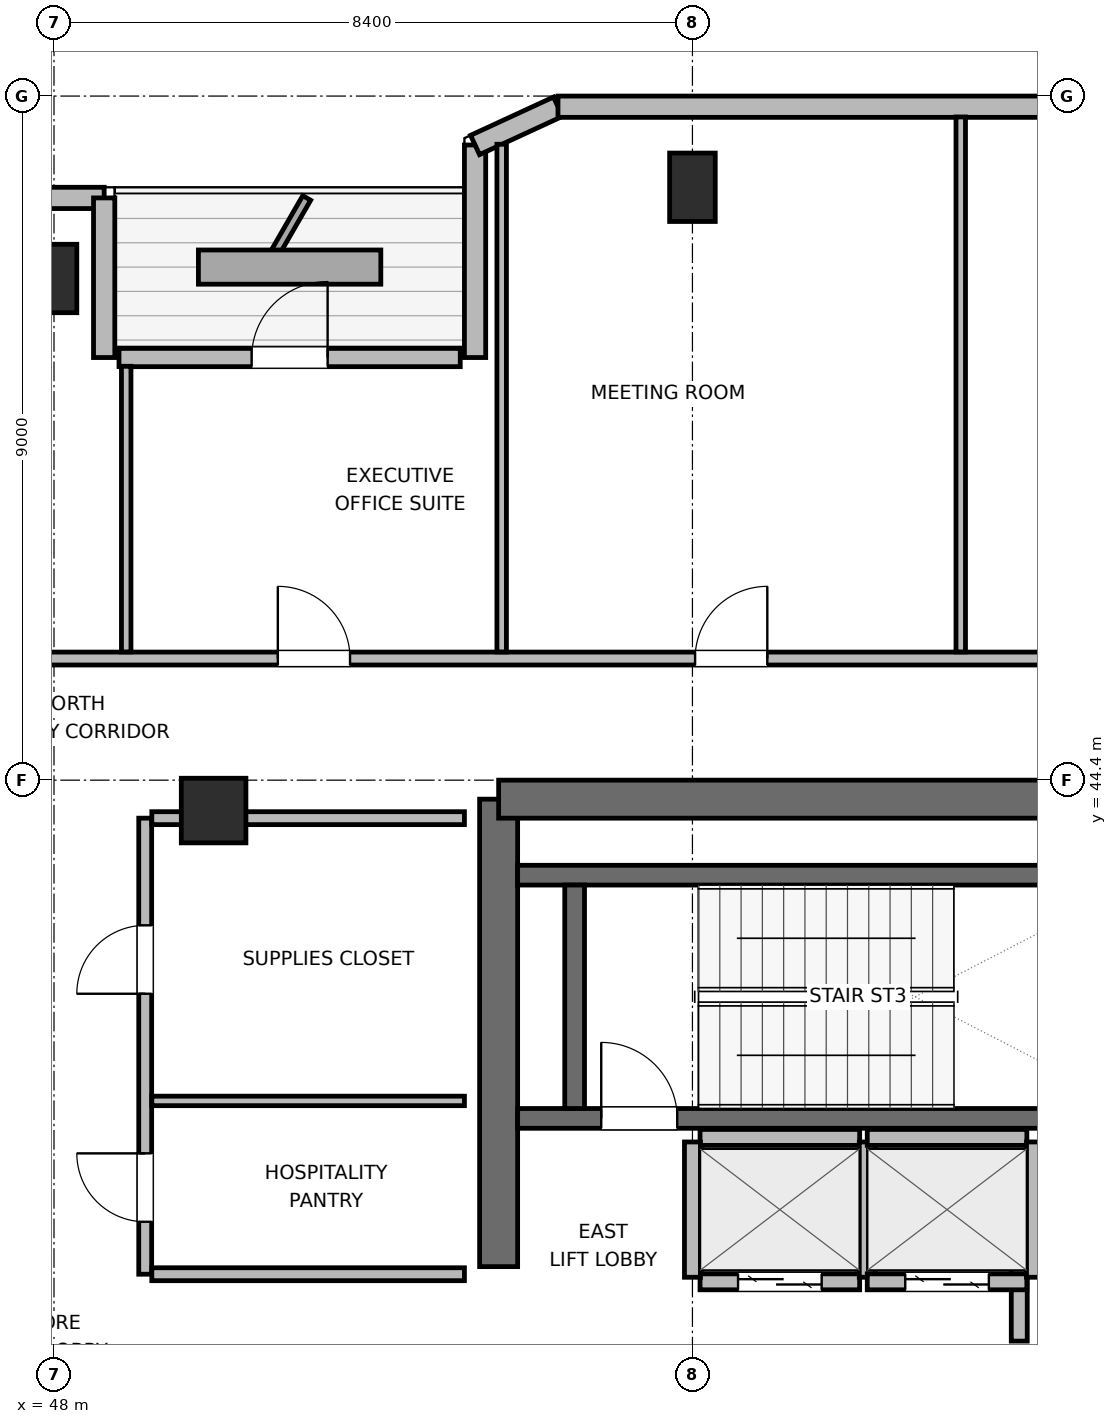
"""IFC4 building model, lengths in metres.
Left out: names, types, materials, properties, quantities, classifications, styles, units other than length and angle.
Written with IfcOpenShell. Run it as: python <this file> out.ifc"""

import sys

from ifc_helpers import new_model, si_unit, direction, frame, frame_2d, origin, origin_2d, place, context, subcontext, project, spatial, rectangle, extrude, element, fill, save


model = new_model("IFC4")
c1 = context("Model", 3, precision=1e-05, world=origin(), true_north=direction((0.0, 1.0)))
c2 = subcontext(c1, "Body", "Model", "MODEL_VIEW")
j1 = project(units=[si_unit("LENGTHUNIT", "METRE"), si_unit("PLANEANGLEUNIT", "RADIAN")], contexts=[c1])
p1 = place(None, origin())
s1 = spatial("IfcSite", under=j1, at=p1, CompositionType="ELEMENT")
p2 = place(p1, origin())
s2 = spatial("IfcBuilding", under=s1, at=p2, CompositionType="ELEMENT")
p3 = place(p2, frame((0.0, 0.0, 350.4)))
s3 = spatial("IfcBuildingStorey", under=s2, at=p3, CompositionType="ELEMENT", Elevation=350.4)
p4 = place(p3, frame((53.85, 38.0, 0.0), z_axis=(0.0, 0.0, 1.0), x_axis=(0.0, 1.0, 0.0)))
e1 = element("IfcWall", 1, at=p4, inside=s3, PredefinedType="SHEAR", context=c2, shape_type="SweptSolid", body=[
    extrude(rectangle(XDim=6.15, YDim=0.5, at=frame_2d((3.075, 0.0))), origin(), (0.0, 0.0, 1.0), 4.5),
])
p5 = place(p3, frame((53.85, 44.15, 0.0), z_axis=(0.0, 0.0, 1.0), x_axis=(1.0, 0.0, 0.0)))
e2 = element("IfcWall", 2, at=p5, inside=s3, PredefinedType="SHEAR", context=c2, shape_type="SweptSolid", body=[
    extrude(rectangle(XDim=9.5, YDim=0.5, at=frame_2d((4.75, 0.0))), origin(), (0.0, 0.0, 1.0), 4.5),
])
p6 = place(p3, frame((54.1, 39.95, 0.0), z_axis=(0.0, 0.0, 1.0), x_axis=(1.0, 0.0, 0.0)))
e3 = element("IfcWall", 3, at=p6, inside=s3, PredefinedType="SHEAR", context=c2, shape_type="SweptSolid", body=[
    extrude(rectangle(XDim=9.0, YDim=0.26, at=frame_2d((4.5, 0.0))), origin(), (0.0, 0.0, 1.0), 4.5),
])
p7 = place(p6, frame((1.1, 0.0, 0.0)))
e4 = element("IfcOpeningElement", 4, at=p7, cuts=e3, PredefinedType="OPENING", context=c2, shape_type="SweptSolid", body=[
    extrude(rectangle(XDim=1.0, YDim=2.04, at=frame_2d((0.5, 1.02))), frame((0.0, 0.14, 0.0), z_axis=(0.0, -1.0, 0.0), x_axis=(1.0, 0.0, 0.0)), (0.0, 0.0, 1.0), 0.28),
])
p8 = place(p3, frame((54.1, 43.15, 0.0), z_axis=(0.0, 0.0, 1.0), x_axis=(1.0, 0.0, 0.0)))
e5 = element("IfcWall", 5, at=p8, inside=s3, PredefinedType="SHEAR", context=c2, shape_type="SweptSolid", body=[
    extrude(rectangle(XDim=9.0, YDim=0.26, at=frame_2d((4.5, 0.0))), origin(), (0.0, 0.0, 1.0), 4.5),
])
p9 = place(p3, frame((54.85, 40.08, 0.0), z_axis=(0.0, 0.0, 1.0), x_axis=(0.0, 1.0, 0.0)))
e6 = element("IfcWall", 6, at=p9, inside=s3, PredefinedType="SHEAR", context=c2, shape_type="SweptSolid", body=[
    extrude(rectangle(XDim=2.94, YDim=0.26, at=frame_2d((1.47, 0.0))), origin(), (0.0, 0.0, 1.0), 4.5),
])
for number, where, z_axis, x_axis in (
    (7, (48.0, 51.0, 0.0), (0.0, 0.0, 1.0), (1.0, 0.0, 0.0)),
    (8, (56.4, 52.2, 0.0), (0.0, 0.0, 1.0), (1.0, 0.0, 0.0)),
):
    element("IfcColumn", number, at=place(p3, frame(where, z_axis=z_axis, x_axis=x_axis)), inside=s3, PredefinedType="COLUMN", context=c2, shape_type="SweptSolid", body=[
        extrude(rectangle(XDim=0.6, YDim=0.9, at=origin_2d()), origin(), (0.0, 0.0, 1.0), 4.5),
    ])
p10 = place(p3, frame((50.1, 44.0, 0.0), z_axis=(0.0, 0.0, 1.0), x_axis=(1.0, 0.0, 0.0)))
e9 = element("IfcColumn", 9, at=p10, inside=s3, PredefinedType="COLUMN", context=c2, shape_type="SweptSolid", body=[
    extrude(rectangle(XDim=0.85, YDim=0.85, at=origin_2d()), origin(), (0.0, 0.0, 1.0), 4.5),
])
p11 = place(p3, frame((43.969, 52.06, 0.0), z_axis=(0.0, 0.0, 1.0), x_axis=(1.0, 0.0, 0.0)))
e10 = element("IfcWall", 10, at=p11, inside=s3, PredefinedType="SOLIDWALL", context=c2, shape_type="SweptSolid", body=[
    extrude(rectangle(XDim=4.691, YDim=0.28, at=frame_2d((2.345, 0.0))), origin(), (0.0, 0.0, 1.0), 2.735),
])
p12 = place(p11, frame((1.295, 0.0, 0.85)))
e11 = element("IfcOpeningElement", 11, at=p12, cuts=e10, PredefinedType="OPENING", context=c2, shape_type="SweptSolid", body=[
    extrude(rectangle(XDim=2.1, YDim=1.05, at=frame_2d((1.05, 0.525))), frame((0.0, 0.15, 0.0), z_axis=(0.0, -1.0, 0.0), x_axis=(1.0, 0.0, 0.0)), (0.0, 0.0, 1.0), 0.3),
])
p13 = place(p3, frame((48.66, 52.06, 0.0), z_axis=(0.0, 0.0, 1.0), x_axis=(0.0, -1.0, 0.0)))
e12 = element("IfcWall", 12, at=p13, inside=s3, PredefinedType="SOLIDWALL", context=c2, shape_type="SweptSolid", body=[
    extrude(rectangle(XDim=2.1, YDim=0.28, at=frame_2d((1.05, 0.0))), origin(), (0.0, 0.0, 1.0), 2.735),
])
p14 = place(p3, frame((48.855, 49.96, 0.0), z_axis=(0.0, 0.0, 1.0), x_axis=(1.0, 0.0, 0.0)))
e13 = element("IfcWall", 13, at=p14, inside=s3, PredefinedType="SOLIDWALL", context=c2, shape_type="SweptSolid", body=[
    extrude(rectangle(XDim=4.49, YDim=0.24, at=frame_2d((2.245, 0.0))), origin(), (0.0, 0.0, 1.0), 2.735),
])
p15 = place(p14, frame((1.745, 0.0, 0.0)))
e14 = element("IfcOpeningElement", 14, at=p15, cuts=e13, PredefinedType="OPENING", context=c2, shape_type="SweptSolid", body=[
    extrude(rectangle(XDim=1.0, YDim=2.02, at=frame_2d((0.5, 1.01))), frame((0.0, 0.13, 0.0), z_axis=(0.0, -1.0, 0.0), x_axis=(1.0, 0.0, 0.0)), (0.0, 0.0, 1.0), 0.26),
])
p16 = place(p3, frame((53.54, 49.96, 0.0), z_axis=(0.0, 0.0, 1.0), x_axis=(0.0, 1.0, 0.0)))
e15 = element("IfcWall", 15, at=p16, inside=s3, PredefinedType="SOLIDWALL", context=c2, shape_type="SweptSolid", body=[
    extrude(rectangle(XDim=2.796, YDim=0.28, at=frame_2d((1.398, 0.0))), origin(), (0.0, 0.0, 1.0), 2.735),
])
p17 = place(p3, frame((53.54, 52.756, 0.0), z_axis=(0.0, 0.0, 1.0), x_axis=(0.907893953211, 0.419199916176, 0.0)))
e16 = element("IfcWall", 16, at=p17, inside=s3, PredefinedType="SOLIDWALL", context=c2, shape_type="SweptSolid", body=[
    extrude(rectangle(XDim=1.201, YDim=0.28, at=frame_2d((0.601, 0.0))), origin(), (0.0, 0.0, 1.0), 4.2),
])
p18 = place(p3, frame((54.631, 53.26, 0.0), z_axis=(0.0, 0.0, 1.0), x_axis=(1.0, 0.0, 0.0)))
e17 = element("IfcWall", 17, at=p18, inside=s3, PredefinedType="SOLIDWALL", context=c2, shape_type="SweptSolid", body=[
    extrude(rectangle(XDim=11.351, YDim=0.28, at=frame_2d((5.675, 0.0))), origin(), (0.0, 0.0, 1.0), 4.2),
])
p19 = place(p3, frame((60.72, 39.1, 0.0), z_axis=(0.0, 0.0, 1.0), x_axis=(1.0, 0.0, 0.0)))
e18 = element("IfcWall", 18, at=p19, inside=s3, PredefinedType="PARTITIONING", context=c2, shape_type="SweptSolid", body=[
    extrude(rectangle(XDim=1.8, YDim=0.21, at=frame_2d((0.9, 0.0))), origin(), (0.0, 0.0, 1.0), 4.2),
])
p20 = place(p3, frame((60.7, 37.02, 0.0), z_axis=(0.0, 0.0, 1.0), x_axis=(0.0, 1.0, 0.0)))
e19 = element("IfcWall", 19, at=p20, inside=s3, PredefinedType="PARTITIONING", context=c2, shape_type="SweptSolid", body=[
    extrude(rectangle(XDim=1.96, YDim=0.21, at=frame_2d((0.98, 0.0))), origin(), (0.0, 0.0, 1.0), 4.2),
])
p21 = place(p3, frame((56.5, 37.8, 0.0), z_axis=(0.0, 0.0, 1.0), x_axis=(1.0, 0.0, 0.0)))
e20 = element("IfcWall", 20, at=p21, inside=s3, PredefinedType="PARTITIONING", context=c2, shape_type="SweptSolid", body=[
    extrude(rectangle(XDim=2.1, YDim=0.21, at=frame_2d((1.05, 0.0))), origin(), (0.0, 0.0, 1.0), 4.2),
])
p22 = place(p21, frame((0.5, 0.0, 0.0)))
e21 = element("IfcOpeningElement", 21, at=p22, cuts=e20, PredefinedType="OPENING", context=c2, shape_type="SweptSolid", body=[
    extrude(rectangle(XDim=1.1, YDim=2.04, at=frame_2d((0.55, 1.02))), frame((0.0, 0.115, 0.0), z_axis=(0.0, -1.0, 0.0), x_axis=(1.0, 0.0, 0.0)), (0.0, 0.0, 1.0), 0.23),
])
p23 = place(p3, frame((56.5, 39.7, 0.0), z_axis=(0.0, 0.0, 1.0), x_axis=(1.0, 0.0, 0.0)))
e22 = element("IfcWall", 22, at=p23, inside=s3, PredefinedType="PARTITIONING", context=c2, shape_type="SweptSolid", body=[
    extrude(rectangle(XDim=2.1, YDim=0.21, at=frame_2d((1.05, 0.0))), origin(), (0.0, 0.0, 1.0), 4.2),
])
for number, where, z_axis, x_axis in (
    (23, (56.4, 37.86, 0.0), (0.0, 0.0, 1.0), (0.0, 1.0, 0.0)),
    (24, (58.7, 37.86, 0.0), (0.0, 0.0, 1.0), (0.0, 1.0, 0.0)),
):
    element("IfcWall", number, at=place(p3, frame(where, z_axis=z_axis, x_axis=x_axis)), inside=s3, PredefinedType="PARTITIONING", context=c2, shape_type="SweptSolid", body=[
        extrude(rectangle(XDim=1.78, YDim=0.21, at=frame_2d((0.89, 0.0))), origin(), (0.0, 0.0, 1.0), 4.2),
    ])
p24 = place(p3, frame((58.7, 37.8, 0.0), z_axis=(0.0, 0.0, 1.0), x_axis=(1.0, 0.0, 0.0)))
e25 = element("IfcWall", 25, at=p24, inside=s3, PredefinedType="PARTITIONING", context=c2, shape_type="SweptSolid", body=[
    extrude(rectangle(XDim=2.1, YDim=0.21, at=frame_2d((1.05, 0.0))), origin(), (0.0, 0.0, 1.0), 4.2),
])
p25 = place(p24, frame((0.5, 0.0, 0.0)))
e26 = element("IfcOpeningElement", 26, at=p25, cuts=e25, PredefinedType="OPENING", context=c2, shape_type="SweptSolid", body=[
    extrude(rectangle(XDim=1.1, YDim=2.04, at=frame_2d((0.55, 1.02))), frame((0.0, 0.115, 0.0), z_axis=(0.0, -1.0, 0.0), x_axis=(1.0, 0.0, 0.0)), (0.0, 0.0, 1.0), 0.23),
])
p26 = place(p3, frame((58.7, 39.7, 0.0), z_axis=(0.0, 0.0, 1.0), x_axis=(1.0, 0.0, 0.0)))
e27 = element("IfcWall", 27, at=p26, inside=s3, PredefinedType="PARTITIONING", context=c2, shape_type="SweptSolid", body=[
    extrude(rectangle(XDim=2.1, YDim=0.21, at=frame_2d((1.05, 0.0))), origin(), (0.0, 0.0, 1.0), 4.2),
])
p27 = place(p3, frame((60.9, 37.86, 0.0), z_axis=(0.0, 0.0, 1.0), x_axis=(0.0, 1.0, 0.0)))
e28 = element("IfcWall", 28, at=p27, inside=s3, PredefinedType="PARTITIONING", context=c2, shape_type="SweptSolid", body=[
    extrude(rectangle(XDim=1.78, YDim=0.21, at=frame_2d((0.89, 0.0))), origin(), (0.0, 0.0, 1.0), 4.2),
])
p28 = place(p3, frame((49.2, 37.9, 0.0), z_axis=(0.0, 0.0, 1.0), x_axis=(0.0, 1.0, 0.0)))
e29 = element("IfcWall", 29, at=p28, inside=s3, PredefinedType="PARTITIONING", context=c2, shape_type="SweptSolid", body=[
    extrude(rectangle(XDim=6.0, YDim=0.17, at=frame_2d((3.0, 0.0))), origin(), (0.0, 0.0, 1.0), 4.2),
])
p29 = place(p28, frame((0.69, 0.0, 0.0)))
e30 = element("IfcOpeningElement", 30, at=p29, cuts=e29, PredefinedType="OPENING", context=c2, shape_type="SweptSolid", body=[
    extrude(rectangle(XDim=0.9, YDim=2.02, at=frame_2d((0.45, 1.01))), frame((0.0, 0.095, 0.0), z_axis=(0.0, -1.0, 0.0), x_axis=(1.0, 0.0, 0.0)), (0.0, 0.0, 1.0), 0.19),
])
p30 = place(p28, frame((3.69, 0.0, 0.0)))
e31 = element("IfcOpeningElement", 31, at=p30, cuts=e29, PredefinedType="OPENING", context=c2, shape_type="SweptSolid", body=[
    extrude(rectangle(XDim=0.9, YDim=2.02, at=frame_2d((0.45, 1.01))), frame((0.0, 0.095, 0.0), z_axis=(0.0, -1.0, 0.0), x_axis=(1.0, 0.0, 0.0)), (0.0, 0.0, 1.0), 0.19),
])
p31 = place(p3, frame((49.287, 37.9, 0.0), z_axis=(0.0, 0.0, 1.0), x_axis=(1.0, 0.0, 0.0)))
e32 = element("IfcWall", 32, at=p31, inside=s3, PredefinedType="PARTITIONING", context=c2, shape_type="SweptSolid", body=[
    extrude(rectangle(XDim=4.113, YDim=0.17, at=frame_2d((2.056, 0.0))), origin(), (0.0, 0.0, 1.0), 4.2),
])
p32 = place(p3, frame((49.287, 43.9, 0.0), z_axis=(0.0, 0.0, 1.0), x_axis=(1.0, 0.0, 0.0)))
e33 = element("IfcWall", 33, at=p32, inside=s3, PredefinedType="PARTITIONING", context=c2, shape_type="SweptSolid", body=[
    extrude(rectangle(XDim=4.113, YDim=0.17, at=frame_2d((2.056, 0.0))), origin(), (0.0, 0.0, 1.0), 3.285),
])
p33 = place(p3, frame((49.287, 40.18, 0.0), z_axis=(0.0, 0.0, 1.0), x_axis=(1.0, 0.0, 0.0)))
e34 = element("IfcWall", 34, at=p33, inside=s3, PredefinedType="PARTITIONING", context=c2, shape_type="SweptSolid", body=[
    extrude(rectangle(XDim=4.113, YDim=0.125, at=frame_2d((2.056, 0.0))), origin(), (0.0, 0.0, 1.0), 4.2),
])
p34 = place(p3, frame((30.725, 46.0, 0.0), z_axis=(0.0, 0.0, 1.0), x_axis=(1.0, 0.0, 0.0)))
e35 = element("IfcWall", 35, at=p34, inside=s3, PredefinedType="PARTITIONING", context=c2, shape_type="SweptSolid", body=[
    extrude(rectangle(XDim=32.875, YDim=0.17, at=frame_2d((16.438, 0.0))), origin(), (0.0, 0.0, 1.0), 4.2),
])
p35 = place(p34, frame((3.487, 0.0, 0.0)))
e36 = element("IfcOpeningElement", 36, at=p35, cuts=e35, PredefinedType="OPENING", context=c2, shape_type="SweptSolid", body=[
    extrude(rectangle(XDim=0.95, YDim=2.04, at=frame_2d((0.475, 1.02))), frame((0.0, 0.095, 0.0), z_axis=(0.0, -1.0, 0.0), x_axis=(1.0, 0.0, 0.0)), (0.0, 0.0, 1.0), 0.19),
])
p36 = place(p34, frame((8.685, 0.0, 0.0)))
e37 = element("IfcOpeningElement", 37, at=p36, cuts=e35, PredefinedType="OPENING", context=c2, shape_type="SweptSolid", body=[
    extrude(rectangle(XDim=0.95, YDim=2.04, at=frame_2d((0.475, 1.02))), frame((0.0, 0.095, 0.0), z_axis=(0.0, -1.0, 0.0), x_axis=(1.0, 0.0, 0.0)), (0.0, 0.0, 1.0), 0.19),
])
p37 = place(p34, frame((13.835, 0.0, 0.0)))
e38 = element("IfcOpeningElement", 38, at=p37, cuts=e35, PredefinedType="OPENING", context=c2, shape_type="SweptSolid", body=[
    extrude(rectangle(XDim=0.95, YDim=2.04, at=frame_2d((0.475, 1.02))), frame((0.0, 0.095, 0.0), z_axis=(0.0, -1.0, 0.0), x_axis=(1.0, 0.0, 0.0)), (0.0, 0.0, 1.0), 0.19),
])
p38 = place(p34, frame((20.22, 0.0, 0.0)))
e39 = element("IfcOpeningElement", 39, at=p38, cuts=e35, PredefinedType="OPENING", context=c2, shape_type="SweptSolid", body=[
    extrude(rectangle(XDim=0.95, YDim=2.04, at=frame_2d((0.475, 1.02))), frame((0.0, 0.095, 0.0), z_axis=(0.0, -1.0, 0.0), x_axis=(1.0, 0.0, 0.0)), (0.0, 0.0, 1.0), 0.19),
])
p39 = place(p34, frame((25.71, 0.0, 0.0)))
e40 = element("IfcOpeningElement", 40, at=p39, cuts=e35, PredefinedType="OPENING", context=c2, shape_type="SweptSolid", body=[
    extrude(rectangle(XDim=0.95, YDim=2.04, at=frame_2d((0.475, 1.02))), frame((0.0, 0.095, 0.0), z_axis=(0.0, -1.0, 0.0), x_axis=(1.0, 0.0, 0.0)), (0.0, 0.0, 1.0), 0.19),
])
p40 = place(p34, frame((30.565, 0.0, 0.0)))
e41 = element("IfcOpeningElement", 41, at=p40, cuts=e35, PredefinedType="OPENING", context=c2, shape_type="SweptSolid", body=[
    extrude(rectangle(XDim=0.95, YDim=2.04, at=frame_2d((0.475, 1.02))), frame((0.0, 0.095, 0.0), z_axis=(0.0, -1.0, 0.0), x_axis=(1.0, 0.0, 0.0)), (0.0, 0.0, 1.0), 0.19),
])
p41 = place(p3, frame((48.95, 46.087, 0.0), z_axis=(0.0, 0.0, 1.0), x_axis=(0.0, 1.0, 0.0)))
e42 = element("IfcWall", 42, at=p41, inside=s3, PredefinedType="PARTITIONING", context=c2, shape_type="SweptSolid", body=[
    extrude(rectangle(XDim=3.758, YDim=0.125, at=frame_2d((1.879, 0.0))), origin(), (0.0, 0.0, 1.0), 4.2),
])
p42 = place(p3, frame((53.89, 46.087, 0.0), z_axis=(0.0, 0.0, 1.0), x_axis=(0.0, 1.0, 0.0)))
e43 = element("IfcWall", 43, at=p42, inside=s3, PredefinedType="PARTITIONING", context=c2, shape_type="SweptSolid", body=[
    extrude(rectangle(XDim=6.679, YDim=0.125, at=frame_2d((3.34, 0.0))), origin(), (0.0, 0.0, 1.0), 3.523),
])
p43 = place(p3, frame((59.93, 46.087, 0.0), z_axis=(0.0, 0.0, 1.0), x_axis=(0.0, 1.0, 0.0)))
e44 = element("IfcWall", 44, at=p43, inside=s3, PredefinedType="PARTITIONING", context=c2, shape_type="SweptSolid", body=[
    extrude(rectangle(XDim=7.038, YDim=0.125, at=frame_2d((3.519, 0.0))), origin(), (0.0, 0.0, 1.0), 4.2),
])
p44 = place(p15, origin())
e45 = element("IfcDoor", 45, at=p44, inside=s3, OperationType="SINGLE_SWING_RIGHT", PredefinedType="DOOR", context=c2, shape_type="SweptSolid", body=[
    extrude(rectangle(XDim=1.0, YDim=2.02, at=frame_2d((0.5, 1.01))), frame((0.0, 0.025, 0.0), z_axis=(0.0, -1.0, 0.0), x_axis=(1.0, 0.0, 0.0)), (0.0, 0.0, 1.0), 0.05),
])
fill(e14, e45)
p45 = place(p7, origin())
e46 = element("IfcDoor", 46, at=p45, inside=s3, OperationType="SINGLE_SWING_LEFT", PredefinedType="DOOR", context=c2, shape_type="SweptSolid", body=[
    extrude(rectangle(XDim=1.0, YDim=2.04, at=frame_2d((0.5, 1.02))), frame((0.0, 0.025, 0.0), z_axis=(0.0, -1.0, 0.0), x_axis=(1.0, 0.0, 0.0)), (0.0, 0.0, 1.0), 0.05),
])
fill(e4, e46)
p46 = place(p22, origin())
e47 = element("IfcDoor", 47, at=p46, inside=s3, OperationType="DOUBLE_DOOR_SLIDING", PredefinedType="DOOR", context=c2, shape_type="SweptSolid", body=[
    extrude(rectangle(XDim=1.1, YDim=2.04, at=frame_2d((0.55, 1.02))), frame((0.0, 0.025, 0.0), z_axis=(0.0, -1.0, 0.0), x_axis=(1.0, 0.0, 0.0)), (0.0, 0.0, 1.0), 0.05),
])
fill(e21, e47)
p47 = place(p25, origin())
e48 = element("IfcDoor", 48, at=p47, inside=s3, OperationType="DOUBLE_DOOR_SLIDING", PredefinedType="DOOR", context=c2, shape_type="SweptSolid", body=[
    extrude(rectangle(XDim=1.1, YDim=2.04, at=frame_2d((0.55, 1.02))), frame((0.0, 0.025, 0.0), z_axis=(0.0, -1.0, 0.0), x_axis=(1.0, 0.0, 0.0)), (0.0, 0.0, 1.0), 0.05),
])
fill(e26, e48)
p48 = place(p29, origin())
e49 = element("IfcDoor", 49, at=p48, inside=s3, OperationType="SINGLE_SWING_RIGHT", PredefinedType="DOOR", context=c2, shape_type="SweptSolid", body=[
    extrude(rectangle(XDim=0.9, YDim=2.02, at=frame_2d((0.45, 1.01))), frame((0.0, 0.025, 0.0), z_axis=(0.0, -1.0, 0.0), x_axis=(1.0, 0.0, 0.0)), (0.0, 0.0, 1.0), 0.05),
])
fill(e30, e49)
p49 = place(p30, origin())
e50 = element("IfcDoor", 50, at=p49, inside=s3, OperationType="SINGLE_SWING_LEFT", PredefinedType="DOOR", context=c2, shape_type="SweptSolid", body=[
    extrude(rectangle(XDim=0.9, YDim=2.02, at=frame_2d((0.45, 1.01))), frame((0.0, 0.025, 0.0), z_axis=(0.0, -1.0, 0.0), x_axis=(1.0, 0.0, 0.0)), (0.0, 0.0, 1.0), 0.05),
])
fill(e31, e50)
p50 = place(p38, origin())
e51 = element("IfcDoor", 51, at=p50, inside=s3, OperationType="SINGLE_SWING_LEFT", PredefinedType="DOOR", context=c2, shape_type="SweptSolid", body=[
    extrude(rectangle(XDim=0.95, YDim=2.04, at=frame_2d((0.475, 1.02))), frame((0.0, 0.025, 0.0), z_axis=(0.0, -1.0, 0.0), x_axis=(1.0, 0.0, 0.0)), (0.0, 0.0, 1.0), 0.05),
])
fill(e39, e51)
p51 = place(p39, origin())
e52 = element("IfcDoor", 52, at=p51, inside=s3, OperationType="SINGLE_SWING_RIGHT", PredefinedType="DOOR", context=c2, shape_type="SweptSolid", body=[
    extrude(rectangle(XDim=0.95, YDim=2.04, at=frame_2d((0.475, 1.02))), frame((0.0, 0.025, 0.0), z_axis=(0.0, -1.0, 0.0), x_axis=(1.0, 0.0, 0.0)), (0.0, 0.0, 1.0), 0.05),
])
fill(e40, e52)
save(model, sys.argv[1])
